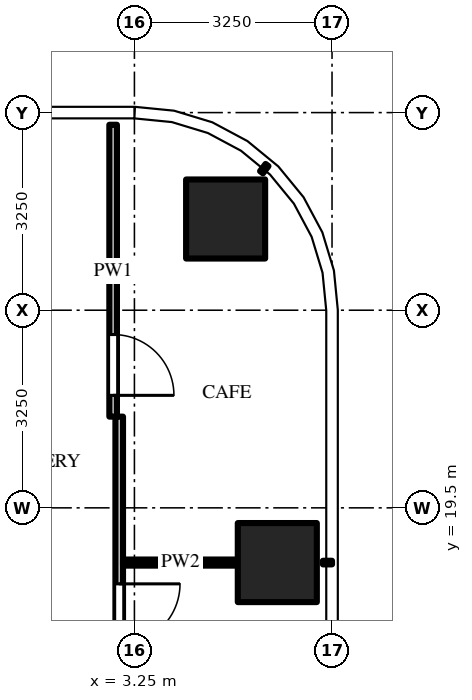
"""IFC4 building model, lengths in metres.
Left out: names, types, materials, properties, quantities, classifications, styles, units other than length and angle.
Written with IfcOpenShell. Run it as: python <this file> out.ifc"""

import sys

from ifc_helpers import new_model, si_unit, direction, frame, frame_2d, origin, origin_2d, place, context, subcontext, project, spatial, rectangle, extrude, source, transform, mapped, element, fill, save


model = new_model("IFC4")
c1 = context("Model", 3, precision=1e-05, world=origin(), true_north=direction((0.0, 1.0)))
c2 = subcontext(c1, "Body", "Model", "MODEL_VIEW")
j1 = project(units=[si_unit("LENGTHUNIT", "METRE"), si_unit("PLANEANGLEUNIT", "RADIAN")], contexts=[c1])
p1 = place(None, origin())
s1 = spatial("IfcSite", under=j1, at=p1, CompositionType="ELEMENT")
p2 = place(p1, origin())
s2 = spatial("IfcBuilding", under=s1, at=p2, CompositionType="ELEMENT")
p3 = place(p2, frame((0.0, 0.0, 124.5)))
s3 = spatial("IfcBuildingStorey", under=s2, at=p3, CompositionType="ELEMENT", Elevation=124.5)
m1 = source(origin(), c2, "Body", "SweptSolid", [
    extrude(rectangle(XDim=1.3, YDim=1.3, at=origin_2d()), origin(), (0.0, 0.0, 1.0), 4.5),
])
for number, where, z_axis, x_axis in (
    (1, (5.6, 18.6, 0.0), (0.0, 0.0, 1.0), (1.0, 0.0, 0.0)),
    (2, (4.75, 24.25, 0.0), (0.0, 0.0, 1.0), (1.0, 0.0, 0.0)),
):
    element("IfcColumn", number, at=place(p3, frame(where, z_axis=z_axis, x_axis=x_axis)), inside=s3, PredefinedType="COLUMN", context=c2, shape_type="MappedRepresentation", body=[
        mapped(m1, transform((0.0, 0.0, 0.0))),
    ])
m2 = source(origin(), c2, "Body", "SweptSolid", [
    extrude(rectangle(XDim=4.8, YDim=0.125, at=frame_2d((2.4, 0.0))), origin(), (0.0, 0.0, 1.0), 3.33),
])
p4 = place(p3, frame((2.9, 25.8, 0.0), z_axis=(0.0, 0.0, 1.0), x_axis=(0.0, -1.0, 0.0)))
e3 = element("IfcWall", 3, at=p4, inside=s3, PredefinedType="PARTITIONING", context=c2, shape_type="MappedRepresentation", body=[
    mapped(m2, transform((0.0, 0.0, 0.0))),
])
m3 = source(origin(), c2, "Body", "SweptSolid", [
    extrude(rectangle(XDim=1.0, YDim=2.1, at=frame_2d((0.5, 1.05))), frame((0.0, 0.073, 0.0), z_axis=(0.0, -1.0, 0.0), x_axis=(1.0, 0.0, 0.0)), (0.0, 0.0, 1.0), 0.145),
])
p5 = place(p4, frame((3.45, 0.0, 0.0)))
e4 = element("IfcOpeningElement", 4, at=p5, cuts=e3, PredefinedType="OPENING", context=c2, shape_type="MappedRepresentation", body=[
    mapped(m3, transform((0.0, 0.0, 0.0))),
])
m4 = source(origin(), c2, "Body", "SweptSolid", [
    extrude(rectangle(XDim=8.8, YDim=0.125, at=frame_2d((4.4, 0.0))), origin(), (0.0, 0.0, 1.0), 3.468),
])
p6 = place(p3, frame((3.0, 21.0, 0.0), z_axis=(0.0, 0.0, 1.0), x_axis=(0.0, -1.0, 0.0)))
e5 = element("IfcWall", 5, at=p6, inside=s3, PredefinedType="PARTITIONING", context=c2, shape_type="MappedRepresentation", body=[
    mapped(m4, transform((0.0, 0.0, 0.0))),
])
p7 = place(p6, frame((2.75, 0.0, 0.0)))
e6 = element("IfcOpeningElement", 6, at=p7, cuts=e5, PredefinedType="OPENING", context=c2, shape_type="MappedRepresentation", body=[
    mapped(m3, transform((0.0, 0.0, 0.0))),
])
m5 = source(origin(), c2, "Body", "SweptSolid", [
    extrude(rectangle(XDim=1.887, YDim=0.1, at=frame_2d((0.944, 0.0))), origin(), (0.0, 0.0, 1.0), 3.697),
])
p8 = place(p3, frame((3.062, 18.6, 0.0), z_axis=(0.0, 0.0, 1.0), x_axis=(1.0, 0.0, 0.0)))
e7 = element("IfcWall", 7, at=p8, inside=s3, PredefinedType="PARTITIONING", context=c2, shape_type="MappedRepresentation", body=[
    mapped(m5, transform((0.0, 0.0, 0.0))),
])
m6 = source(origin(), c2, "Body", "SweptSolid", [
    extrude(rectangle(XDim=1.0, YDim=2.1, at=frame_2d((0.5, 1.05))), frame((0.0, 0.025, 0.0), z_axis=(0.0, -1.0, 0.0), x_axis=(1.0, 0.0, 0.0)), (0.0, 0.0, 1.0), 0.05),
])
p9 = place(p7, origin())
e8 = element("IfcDoor", 8, at=p9, inside=s3, OperationType="SINGLE_SWING_LEFT", PredefinedType="DOOR", context=c2, shape_type="MappedRepresentation", body=[
    mapped(m6, transform((0.0, 0.0, 0.0))),
])
fill(e6, e8)
p10 = place(p5, origin())
e9 = element("IfcDoor", 9, at=p10, inside=s3, OperationType="SINGLE_SWING_RIGHT", PredefinedType="DOOR", context=c2, shape_type="MappedRepresentation", body=[
    mapped(m6, transform((0.0, 0.0, 0.0))),
])
fill(e4, e9)
save(model, sys.argv[1])
